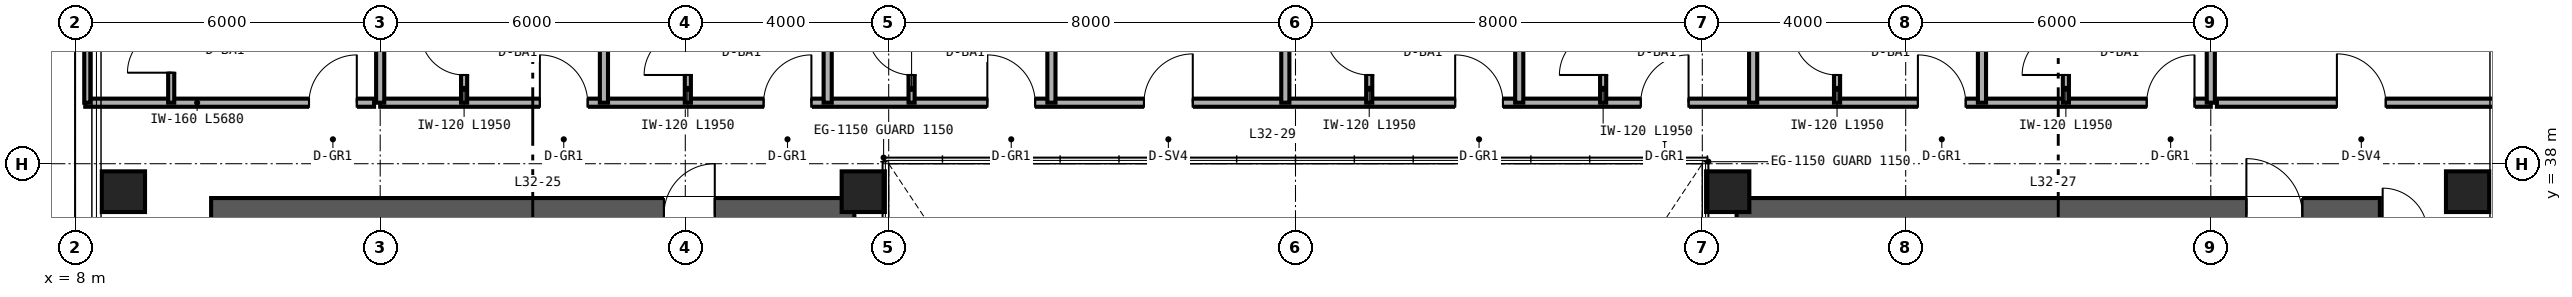
"""IFC4 building model, lengths in metres.
Left out: names, types, materials, properties, quantities, classifications, styles, units other than length and angle.
Written with IfcOpenShell. Run it as: python <this file> out.ifc"""

import sys

from ifc_helpers import new_model, si_unit, direction, frame, frame_2d, origin, origin_2d, place, context, subcontext, project, spatial, rectangle, hollow_rectangle, extrude, source, transform, mapped, element, fill, save


model = new_model("IFC4")
c1 = context("Model", 3, precision=1e-05, world=origin(), true_north=direction((0.0, 1.0)))
c2 = subcontext(c1, "Body", "Model", "MODEL_VIEW")
j1 = project(units=[si_unit("LENGTHUNIT", "METRE"), si_unit("PLANEANGLEUNIT", "RADIAN")], contexts=[c1])
p1 = place(None, origin())
s1 = spatial("IfcSite", under=j1, at=p1, CompositionType="ELEMENT")
p2 = place(p1, origin())
s2 = spatial("IfcBuilding", under=s1, at=p2, CompositionType="ELEMENT")
p3 = place(p2, frame((0.0, 0.0, 129.6)))
s3 = spatial("IfcBuildingStorey", under=s2, at=p3, CompositionType="ELEMENT", Elevation=129.6)
p4 = place(p3, frame((10.675, 37.0, 0.0), z_axis=(0.0, 0.0, 1.0), x_axis=(1.0, 0.0, 0.0)))
e1 = element("IfcWall", 1, at=p4, inside=s3, PredefinedType="SHEAR", context=c2, shape_type="SweptSolid", body=[
    extrude(rectangle(XDim=12.65, YDim=0.65, at=frame_2d((6.325, 0.0))), origin(), (0.0, 0.0, 1.0), 3.36),
])
p5 = place(p4, frame((8.905, 0.0, 0.0)))
e2 = element("IfcOpeningElement", 2, at=p5, cuts=e1, PredefinedType="OPENING", context=c2, shape_type="SweptSolid", body=[
    extrude(rectangle(XDim=1.0, YDim=2.15, at=frame_2d((0.5, 1.075))), frame((0.0, 0.335, 0.0), z_axis=(0.0, -1.0, 0.0), x_axis=(1.0, 0.0, 0.0)), (0.0, 0.0, 1.0), 0.67),
])
p6 = place(p3, frame((40.675, 37.0, 0.0), z_axis=(0.0, 0.0, 1.0), x_axis=(1.0, 0.0, 0.0)))
e3 = element("IfcWall", 3, at=p6, inside=s3, PredefinedType="SHEAR", context=c2, shape_type="SweptSolid", body=[
    extrude(rectangle(XDim=12.65, YDim=0.65, at=frame_2d((6.325, 0.0))), origin(), (0.0, 0.0, 1.0), 3.36),
])
p7 = place(p6, frame((10.025, 0.0, 0.0)))
e4 = element("IfcOpeningElement", 4, at=p7, cuts=e3, PredefinedType="OPENING", context=c2, shape_type="SweptSolid", body=[
    extrude(rectangle(XDim=1.1, YDim=2.15, at=frame_2d((0.55, 1.075))), frame((0.0, 0.335, 0.0), z_axis=(0.0, -1.0, 0.0), x_axis=(1.0, 0.0, 0.0)), (0.0, 0.0, 1.0), 0.67),
])
m1 = source(origin(), c2, "Body", "SweptSolid", [
    extrude(hollow_rectangle(XDim=0.85, YDim=0.8, WallThickness=0.032, at=origin_2d()), origin(), (0.0, 0.0, 1.0), 3.36),
])
for number, where, z_axis, x_axis in (
    (5, (8.95, 37.45, 0.0), (0.0, 0.0, 1.0), (1.0, 0.0, 0.0)),
    (6, (23.5, 37.45, 0.0), (0.0, 0.0, 1.0), (1.0, 0.0, 0.0)),
    (7, (40.5, 37.45, 0.0), (0.0, 0.0, 1.0), (1.0, 0.0, 0.0)),
    (8, (55.05, 37.45, 0.0), (0.0, 0.0, 1.0), (1.0, 0.0, 0.0)),
):
    element("IfcColumn", number, at=place(p3, frame(where, z_axis=z_axis, x_axis=x_axis)), inside=s3, PredefinedType="COLUMN", context=c2, shape_type="MappedRepresentation", body=[
        mapped(m1, transform((0.0, 0.0, 0.0), scale=1.0)),
    ])
p8 = place(p3, frame((8.2, 39.2, 0.0), z_axis=(0.0, 0.0, 1.0), x_axis=(1.0, 0.0, 0.0)))
e9 = element("IfcWall", 9, at=p8, inside=s3, PredefinedType="PARTITIONING", context=c2, shape_type="SweptSolid", body=[
    extrude(rectangle(XDim=5.68, YDim=0.16, at=frame_2d((2.84, 0.0))), origin(), (0.0, 0.0, 1.0), 3.36),
])
p9 = place(p8, frame((4.4, 0.0, 0.0)))
e10 = element("IfcOpeningElement", 10, at=p9, cuts=e9, PredefinedType="OPENING", context=c2, shape_type="SweptSolid", body=[
    extrude(rectangle(XDim=0.94, YDim=2.15, at=frame_2d((0.47, 1.075))), frame((0.0, 0.09, 0.0), z_axis=(0.0, -1.0, 0.0), x_axis=(1.0, 0.0, 0.0)), (0.0, 0.0, 1.0), 0.18),
])
p10 = place(p3, frame((9.89, 39.2, 0.0), z_axis=(0.0, 0.0, 1.0), x_axis=(0.0, 1.0, 0.0)))
e11 = element("IfcWall", 11, at=p10, inside=s3, PredefinedType="PARTITIONING", context=c2, shape_type="SweptSolid", body=[
    extrude(rectangle(XDim=2.04, YDim=0.12, at=frame_2d((1.02, 0.0))), origin(), (0.0, 0.0, 1.0), 3.36),
])
p11 = place(p10, frame((0.59, 0.0, 0.0)))
e12 = element("IfcOpeningElement", 12, at=p11, cuts=e11, PredefinedType="OPENING", context=c2, shape_type="SweptSolid", body=[
    extrude(rectangle(XDim=0.86, YDim=2.1, at=frame_2d((0.43, 1.05))), frame((0.0, 0.07, 0.0), z_axis=(0.0, -1.0, 0.0), x_axis=(1.0, 0.0, 0.0)), (0.0, 0.0, 1.0), 0.14),
])
p12 = place(p3, frame((8.24, 39.2, 0.0), z_axis=(0.0, 0.0, 1.0), x_axis=(0.0, 1.0, 0.0)))
e13 = element("IfcWall", 13, at=p12, inside=s3, PredefinedType="PARTITIONING", context=c2, shape_type="SweptSolid", body=[
    extrude(rectangle(XDim=2.04, YDim=0.12, at=frame_2d((1.02, 0.0))), origin(), (0.0, 0.0, 1.0), 3.36),
])
p13 = place(p3, frame((50.12, 39.2, 0.0), z_axis=(0.0, 0.0, 1.0), x_axis=(1.0, 0.0, 0.0)))
e14 = element("IfcWall", 14, at=p13, inside=s3, PredefinedType="PARTITIONING", context=c2, shape_type="SweptSolid", body=[
    extrude(rectangle(XDim=5.68, YDim=0.16, at=frame_2d((2.84, 0.0))), origin(), (0.0, 0.0, 1.0), 3.36),
])
p14 = place(p13, frame((2.36, 0.0, 0.0)))
e15 = element("IfcOpeningElement", 15, at=p14, cuts=e14, PredefinedType="OPENING", context=c2, shape_type="SweptSolid", body=[
    extrude(rectangle(XDim=0.96, YDim=2.15, at=frame_2d((0.48, 1.075))), frame((0.0, 0.09, 0.0), z_axis=(0.0, -1.0, 0.0), x_axis=(1.0, 0.0, 0.0)), (0.0, 0.0, 1.0), 0.18),
])
p15 = place(p3, frame((14.0, 39.2, 0.0), z_axis=(0.0, 0.0, 1.0), x_axis=(1.0, 0.0, 0.0)))
e16 = element("IfcWall", 16, at=p15, inside=s3, PredefinedType="PARTITIONING", context=c2, shape_type="SweptSolid", body=[
    extrude(rectangle(XDim=36.0, YDim=0.16, at=frame_2d((18.0, 0.0))), origin(), (0.0, 0.0, 1.0), 2.581),
])
p16 = place(p15, frame((3.14, 0.0, 0.0)))
e17 = element("IfcOpeningElement", 17, at=p16, cuts=e16, PredefinedType="OPENING", context=c2, shape_type="SweptSolid", body=[
    extrude(rectangle(XDim=0.94, YDim=2.15, at=frame_2d((0.47, 1.075))), frame((0.0, 0.09, 0.0), z_axis=(0.0, -1.0, 0.0), x_axis=(1.0, 0.0, 0.0)), (0.0, 0.0, 1.0), 0.18),
])
p17 = place(p15, frame((7.54, 0.0, 0.0)))
e18 = element("IfcOpeningElement", 18, at=p17, cuts=e16, PredefinedType="OPENING", context=c2, shape_type="SweptSolid", body=[
    extrude(rectangle(XDim=0.94, YDim=2.15, at=frame_2d((0.47, 1.075))), frame((0.0, 0.09, 0.0), z_axis=(0.0, -1.0, 0.0), x_axis=(1.0, 0.0, 0.0)), (0.0, 0.0, 1.0), 0.18),
])
p18 = place(p15, frame((11.94, 0.0, 0.0)))
e19 = element("IfcOpeningElement", 19, at=p18, cuts=e16, PredefinedType="OPENING", context=c2, shape_type="SweptSolid", body=[
    extrude(rectangle(XDim=0.94, YDim=2.15, at=frame_2d((0.47, 1.075))), frame((0.0, 0.09, 0.0), z_axis=(0.0, -1.0, 0.0), x_axis=(1.0, 0.0, 0.0)), (0.0, 0.0, 1.0), 0.18),
])
p19 = place(p15, frame((15.02, 0.0, 0.0)))
e20 = element("IfcOpeningElement", 20, at=p19, cuts=e16, PredefinedType="OPENING", context=c2, shape_type="SweptSolid", body=[
    extrude(rectangle(XDim=0.96, YDim=2.15, at=frame_2d((0.48, 1.075))), frame((0.0, 0.09, 0.0), z_axis=(0.0, -1.0, 0.0), x_axis=(1.0, 0.0, 0.0)), (0.0, 0.0, 1.0), 0.18),
])
p20 = place(p15, frame((21.14, 0.0, 0.0)))
e21 = element("IfcOpeningElement", 21, at=p20, cuts=e16, PredefinedType="OPENING", context=c2, shape_type="SweptSolid", body=[
    extrude(rectangle(XDim=0.94, YDim=2.15, at=frame_2d((0.47, 1.075))), frame((0.0, 0.09, 0.0), z_axis=(0.0, -1.0, 0.0), x_axis=(1.0, 0.0, 0.0)), (0.0, 0.0, 1.0), 0.18),
])
p21 = place(p15, frame((24.79, 0.0, 0.0)))
e22 = element("IfcOpeningElement", 22, at=p21, cuts=e16, PredefinedType="OPENING", context=c2, shape_type="SweptSolid", body=[
    extrude(rectangle(XDim=0.94, YDim=2.15, at=frame_2d((0.47, 1.075))), frame((0.0, 0.09, 0.0), z_axis=(0.0, -1.0, 0.0), x_axis=(1.0, 0.0, 0.0)), (0.0, 0.0, 1.0), 0.18),
])
p22 = place(p15, frame((30.24, 0.0, 0.0)))
e23 = element("IfcOpeningElement", 23, at=p22, cuts=e16, PredefinedType="OPENING", context=c2, shape_type="SweptSolid", body=[
    extrude(rectangle(XDim=0.94, YDim=2.15, at=frame_2d((0.47, 1.075))), frame((0.0, 0.09, 0.0), z_axis=(0.0, -1.0, 0.0), x_axis=(1.0, 0.0, 0.0)), (0.0, 0.0, 1.0), 0.18),
])
p23 = place(p15, frame((34.74, 0.0, 0.0)))
e24 = element("IfcOpeningElement", 24, at=p23, cuts=e16, PredefinedType="OPENING", context=c2, shape_type="SweptSolid", body=[
    extrude(rectangle(XDim=0.94, YDim=2.15, at=frame_2d((0.47, 1.075))), frame((0.0, 0.09, 0.0), z_axis=(0.0, -1.0, 0.0), x_axis=(1.0, 0.0, 0.0)), (0.0, 0.0, 1.0), 0.18),
])
for number, where, z_axis, x_axis in (
    (25, (14.0, 39.2, 0.0), (0.0, 0.0, 1.0), (0.0, 1.0, 0.0)),
    (26, (50.0, 39.2, 0.0), (0.0, 0.0, 1.0), (0.0, 1.0, 0.0)),
    (27, (18.4, 39.2, 0.0), (0.0, 0.0, 1.0), (0.0, 1.0, 0.0)),
):
    element("IfcWall", number, at=place(p3, frame(where, z_axis=z_axis, x_axis=x_axis)), inside=s3, PredefinedType="PARTITIONING", context=c2, shape_type="SweptSolid", body=[
        extrude(rectangle(XDim=10.44, YDim=0.16, at=frame_2d((5.22, 0.0))), origin(), (0.0, 0.0, 1.0), 2.667),
    ])
p24 = place(p3, frame((15.65, 39.2, 0.0), z_axis=(0.0, 0.0, 1.0), x_axis=(0.0, 1.0, 0.0)))
e28 = element("IfcWall", 28, at=p24, inside=s3, PredefinedType="PARTITIONING", context=c2, shape_type="SweptSolid", body=[
    extrude(rectangle(XDim=1.95, YDim=0.12, at=frame_2d((0.975, 0.0))), origin(), (0.0, 0.0, 1.0), 3.36),
])
p25 = place(p24, frame((0.545, 0.0, 0.0)))
e29 = element("IfcOpeningElement", 29, at=p25, cuts=e28, PredefinedType="OPENING", context=c2, shape_type="SweptSolid", body=[
    extrude(rectangle(XDim=0.86, YDim=2.1, at=frame_2d((0.43, 1.05))), frame((0.0, 0.07, 0.0), z_axis=(0.0, -1.0, 0.0), x_axis=(1.0, 0.0, 0.0)), (0.0, 0.0, 1.0), 0.14),
])
p26 = place(p3, frame((22.8, 39.2, 0.0), z_axis=(0.0, 0.0, 1.0), x_axis=(0.0, 1.0, 0.0)))
e30 = element("IfcWall", 30, at=p26, inside=s3, PredefinedType="PARTITIONING", context=c2, shape_type="SweptSolid", body=[
    extrude(rectangle(XDim=10.44, YDim=0.16, at=frame_2d((5.22, 0.0))), origin(), (0.0, 0.0, 1.0), 2.823),
])
p27 = place(p3, frame((20.05, 39.2, 0.0), z_axis=(0.0, 0.0, 1.0), x_axis=(0.0, 1.0, 0.0)))
e31 = element("IfcWall", 31, at=p27, inside=s3, PredefinedType="PARTITIONING", context=c2, shape_type="SweptSolid", body=[
    extrude(rectangle(XDim=1.95, YDim=0.12, at=frame_2d((0.975, 0.0))), origin(), (0.0, 0.0, 1.0), 3.36),
])
p28 = place(p27, frame((0.545, 0.0, 0.0)))
e32 = element("IfcOpeningElement", 32, at=p28, cuts=e31, PredefinedType="OPENING", context=c2, shape_type="SweptSolid", body=[
    extrude(rectangle(XDim=0.86, YDim=2.1, at=frame_2d((0.43, 1.05))), frame((0.0, 0.07, 0.0), z_axis=(0.0, -1.0, 0.0), x_axis=(1.0, 0.0, 0.0)), (0.0, 0.0, 1.0), 0.14),
])
p29 = place(p3, frame((27.2, 39.2, 0.0), z_axis=(0.0, 0.0, 1.0), x_axis=(0.0, 1.0, 0.0)))
e33 = element("IfcWall", 33, at=p29, inside=s3, PredefinedType="PARTITIONING", context=c2, shape_type="SweptSolid", body=[
    extrude(rectangle(XDim=10.44, YDim=0.16, at=frame_2d((5.22, 0.0))), origin(), (0.0, 0.0, 1.0), 2.433),
])
p30 = place(p3, frame((24.45, 39.2, 0.0), z_axis=(0.0, 0.0, 1.0), x_axis=(0.0, 1.0, 0.0)))
e34 = element("IfcWall", 34, at=p30, inside=s3, PredefinedType="PARTITIONING", context=c2, shape_type="SweptSolid", body=[
    extrude(rectangle(XDim=1.95, YDim=0.12, at=frame_2d((0.975, 0.0))), origin(), (0.0, 0.0, 1.0), 3.36),
])
p31 = place(p30, frame((0.545, 0.0, 0.0)))
e35 = element("IfcOpeningElement", 35, at=p31, cuts=e34, PredefinedType="OPENING", context=c2, shape_type="SweptSolid", body=[
    extrude(rectangle(XDim=0.86, YDim=2.1, at=frame_2d((0.43, 1.05))), frame((0.0, 0.07, 0.0), z_axis=(0.0, -1.0, 0.0), x_axis=(1.0, 0.0, 0.0)), (0.0, 0.0, 1.0), 0.14),
])
for number, where, z_axis, x_axis in (
    (36, (31.8, 39.2, 0.0), (0.0, 0.0, 1.0), (0.0, 1.0, 0.0)),
    (37, (36.4, 39.2, 0.0), (0.0, 0.0, 1.0), (0.0, 1.0, 0.0)),
):
    element("IfcWall", number, at=place(p3, frame(where, z_axis=z_axis, x_axis=x_axis)), inside=s3, PredefinedType="PARTITIONING", context=c2, shape_type="SweptSolid", body=[
        extrude(rectangle(XDim=10.44, YDim=0.16, at=frame_2d((5.22, 0.0))), origin(), (0.0, 0.0, 1.0), 2.433),
    ])
p32 = place(p3, frame((33.45, 39.2, 0.0), z_axis=(0.0, 0.0, 1.0), x_axis=(0.0, 1.0, 0.0)))
e38 = element("IfcWall", 38, at=p32, inside=s3, PredefinedType="PARTITIONING", context=c2, shape_type="SweptSolid", body=[
    extrude(rectangle(XDim=1.95, YDim=0.12, at=frame_2d((0.975, 0.0))), origin(), (0.0, 0.0, 1.0), 3.36),
])
p33 = place(p32, frame((0.545, 0.0, 0.0)))
e39 = element("IfcOpeningElement", 39, at=p33, cuts=e38, PredefinedType="OPENING", context=c2, shape_type="SweptSolid", body=[
    extrude(rectangle(XDim=0.86, YDim=2.1, at=frame_2d((0.43, 1.05))), frame((0.0, 0.07, 0.0), z_axis=(0.0, -1.0, 0.0), x_axis=(1.0, 0.0, 0.0)), (0.0, 0.0, 1.0), 0.14),
])
p34 = place(p3, frame((41.0, 39.2, 0.0), z_axis=(0.0, 0.0, 1.0), x_axis=(0.0, 1.0, 0.0)))
e40 = element("IfcWall", 40, at=p34, inside=s3, PredefinedType="PARTITIONING", context=c2, shape_type="SweptSolid", body=[
    extrude(rectangle(XDim=10.44, YDim=0.16, at=frame_2d((5.22, 0.0))), origin(), (0.0, 0.0, 1.0), 2.823),
])
p35 = place(p3, frame((38.05, 39.2, 0.0), z_axis=(0.0, 0.0, 1.0), x_axis=(0.0, 1.0, 0.0)))
e41 = element("IfcWall", 41, at=p35, inside=s3, PredefinedType="PARTITIONING", context=c2, shape_type="SweptSolid", body=[
    extrude(rectangle(XDim=1.95, YDim=0.12, at=frame_2d((0.975, 0.0))), origin(), (0.0, 0.0, 1.0), 3.36),
])
p36 = place(p35, frame((0.545, 0.0, 0.0)))
e42 = element("IfcOpeningElement", 42, at=p36, cuts=e41, PredefinedType="OPENING", context=c2, shape_type="SweptSolid", body=[
    extrude(rectangle(XDim=0.86, YDim=2.1, at=frame_2d((0.43, 1.05))), frame((0.0, 0.07, 0.0), z_axis=(0.0, -1.0, 0.0), x_axis=(1.0, 0.0, 0.0)), (0.0, 0.0, 1.0), 0.14),
])
p37 = place(p3, frame((45.5, 39.2, 0.0), z_axis=(0.0, 0.0, 1.0), x_axis=(0.0, 1.0, 0.0)))
e43 = element("IfcWall", 43, at=p37, inside=s3, PredefinedType="PARTITIONING", context=c2, shape_type="SweptSolid", body=[
    extrude(rectangle(XDim=10.44, YDim=0.16, at=frame_2d((5.22, 0.0))), origin(), (0.0, 0.0, 1.0), 2.667),
])
p38 = place(p3, frame((42.65, 39.2, 0.0), z_axis=(0.0, 0.0, 1.0), x_axis=(0.0, 1.0, 0.0)))
e44 = element("IfcWall", 44, at=p38, inside=s3, PredefinedType="PARTITIONING", context=c2, shape_type="SweptSolid", body=[
    extrude(rectangle(XDim=1.95, YDim=0.12, at=frame_2d((0.975, 0.0))), origin(), (0.0, 0.0, 1.0), 3.36),
])
p39 = place(p38, frame((0.545, 0.0, 0.0)))
e45 = element("IfcOpeningElement", 45, at=p39, cuts=e44, PredefinedType="OPENING", context=c2, shape_type="SweptSolid", body=[
    extrude(rectangle(XDim=0.86, YDim=2.1, at=frame_2d((0.43, 1.05))), frame((0.0, 0.07, 0.0), z_axis=(0.0, -1.0, 0.0), x_axis=(1.0, 0.0, 0.0)), (0.0, 0.0, 1.0), 0.14),
])
p40 = place(p3, frame((47.15, 39.2, 0.0), z_axis=(0.0, 0.0, 1.0), x_axis=(0.0, 1.0, 0.0)))
e46 = element("IfcWall", 46, at=p40, inside=s3, PredefinedType="PARTITIONING", context=c2, shape_type="SweptSolid", body=[
    extrude(rectangle(XDim=1.95, YDim=0.12, at=frame_2d((0.975, 0.0))), origin(), (0.0, 0.0, 1.0), 3.36),
])
p41 = place(p40, frame((0.545, 0.0, 0.0)))
e47 = element("IfcOpeningElement", 47, at=p41, cuts=e46, PredefinedType="OPENING", context=c2, shape_type="SweptSolid", body=[
    extrude(rectangle(XDim=0.86, YDim=2.1, at=frame_2d((0.43, 1.05))), frame((0.0, 0.07, 0.0), z_axis=(0.0, -1.0, 0.0), x_axis=(1.0, 0.0, 0.0)), (0.0, 0.0, 1.0), 0.14),
])
m2 = source(origin(), c2, "Body", "SweptSolid", [
    extrude(rectangle(XDim=1.0, YDim=2.15, at=frame_2d((0.5, 1.075))), frame((0.0, 0.025, 0.0), z_axis=(0.0, -1.0, 0.0), x_axis=(1.0, 0.0, 0.0)), (0.0, 0.0, 1.0), 0.05),
])
p42 = place(p5, origin())
e48 = element("IfcDoor", 48, at=p42, inside=s3, OperationType="SINGLE_SWING_RIGHT", PredefinedType="DOOR", context=c2, shape_type="MappedRepresentation", body=[
    mapped(m2, transform((0.0, 0.0, 0.0), scale=1.0)),
])
fill(e2, e48)
m3 = source(origin(), c2, "Body", "SweptSolid", [
    extrude(rectangle(XDim=1.1, YDim=2.15, at=frame_2d((0.55, 1.075))), frame((0.0, 0.025, 0.0), z_axis=(0.0, -1.0, 0.0), x_axis=(1.0, 0.0, 0.0)), (0.0, 0.0, 1.0), 0.05),
])
p43 = place(p7, origin())
e49 = element("IfcDoor", 49, at=p43, inside=s3, OperationType="SINGLE_SWING_LEFT", PredefinedType="DOOR", context=c2, shape_type="MappedRepresentation", body=[
    mapped(m3, transform((0.0, 0.0, 0.0), scale=1.0)),
])
fill(e4, e49)
m4 = source(origin(), c2, "Body", "SweptSolid", [
    extrude(rectangle(XDim=0.86, YDim=2.1, at=frame_2d((0.43, 1.05))), frame((0.0, 0.025, 0.0), z_axis=(0.0, -1.0, 0.0), x_axis=(1.0, 0.0, 0.0)), (0.0, 0.0, 1.0), 0.05),
])
p44 = place(p11, origin())
e50 = element("IfcDoor", 50, at=p44, inside=s3, OperationType="SINGLE_SWING_LEFT", PredefinedType="DOOR", context=c2, shape_type="MappedRepresentation", body=[
    mapped(m4, transform((0.0, 0.0, 0.0), scale=1.0)),
])
fill(e12, e50)
m5 = source(origin(), c2, "Body", "SweptSolid", [
    extrude(rectangle(XDim=0.94, YDim=2.15, at=frame_2d((0.47, 1.075))), frame((0.0, 0.025, 0.0), z_axis=(0.0, -1.0, 0.0), x_axis=(1.0, 0.0, 0.0)), (0.0, 0.0, 1.0), 0.05),
])
p45 = place(p9, origin())
e51 = element("IfcDoor", 51, at=p45, inside=s3, OperationType="SINGLE_SWING_RIGHT", PredefinedType="DOOR", context=c2, shape_type="MappedRepresentation", body=[
    mapped(m5, transform((0.0, 0.0, 0.0), scale=1.0)),
])
fill(e10, e51)
m6 = source(origin(), c2, "Body", "SweptSolid", [
    extrude(rectangle(XDim=0.96, YDim=2.15, at=frame_2d((0.48, 1.075))), frame((0.0, 0.025, 0.0), z_axis=(0.0, -1.0, 0.0), x_axis=(1.0, 0.0, 0.0)), (0.0, 0.0, 1.0), 0.05),
])
p46 = place(p14, origin())
e52 = element("IfcDoor", 52, at=p46, inside=s3, OperationType="SINGLE_SWING_LEFT", PredefinedType="DOOR", context=c2, shape_type="MappedRepresentation", body=[
    mapped(m6, transform((0.0, 0.0, 0.0), scale=1.0)),
])
fill(e15, e52)
p47 = place(p25, origin())
e53 = element("IfcDoor", 53, at=p47, inside=s3, OperationType="SINGLE_SWING_RIGHT", PredefinedType="DOOR", context=c2, shape_type="MappedRepresentation", body=[
    mapped(m4, transform((0.0, 0.0, 0.0), scale=1.0)),
])
fill(e29, e53)
p48 = place(p28, origin())
e54 = element("IfcDoor", 54, at=p48, inside=s3, OperationType="SINGLE_SWING_LEFT", PredefinedType="DOOR", context=c2, shape_type="MappedRepresentation", body=[
    mapped(m4, transform((0.0, 0.0, 0.0), scale=1.0)),
])
fill(e32, e54)
p49 = place(p31, origin())
e55 = element("IfcDoor", 55, at=p49, inside=s3, OperationType="SINGLE_SWING_RIGHT", PredefinedType="DOOR", context=c2, shape_type="MappedRepresentation", body=[
    mapped(m4, transform((0.0, 0.0, 0.0), scale=1.0)),
])
fill(e35, e55)
p50 = place(p33, origin())
e56 = element("IfcDoor", 56, at=p50, inside=s3, OperationType="SINGLE_SWING_RIGHT", PredefinedType="DOOR", context=c2, shape_type="MappedRepresentation", body=[
    mapped(m4, transform((0.0, 0.0, 0.0), scale=1.0)),
])
fill(e39, e56)
p51 = place(p36, origin())
e57 = element("IfcDoor", 57, at=p51, inside=s3, OperationType="SINGLE_SWING_LEFT", PredefinedType="DOOR", context=c2, shape_type="MappedRepresentation", body=[
    mapped(m4, transform((0.0, 0.0, 0.0), scale=1.0)),
])
fill(e42, e57)
p52 = place(p39, origin())
e58 = element("IfcDoor", 58, at=p52, inside=s3, OperationType="SINGLE_SWING_RIGHT", PredefinedType="DOOR", context=c2, shape_type="MappedRepresentation", body=[
    mapped(m4, transform((0.0, 0.0, 0.0), scale=1.0)),
])
fill(e45, e58)
p53 = place(p41, origin())
e59 = element("IfcDoor", 59, at=p53, inside=s3, OperationType="SINGLE_SWING_LEFT", PredefinedType="DOOR", context=c2, shape_type="MappedRepresentation", body=[
    mapped(m4, transform((0.0, 0.0, 0.0), scale=1.0)),
])
fill(e47, e59)
p54 = place(p16, origin())
e60 = element("IfcDoor", 60, at=p54, inside=s3, OperationType="SINGLE_SWING_LEFT", PredefinedType="DOOR", context=c2, shape_type="MappedRepresentation", body=[
    mapped(m5, transform((0.0, 0.0, 0.0), scale=1.0)),
])
fill(e17, e60)
p55 = place(p17, origin())
e61 = element("IfcDoor", 61, at=p55, inside=s3, OperationType="SINGLE_SWING_RIGHT", PredefinedType="DOOR", context=c2, shape_type="MappedRepresentation", body=[
    mapped(m5, transform((0.0, 0.0, 0.0), scale=1.0)),
])
fill(e18, e61)
p56 = place(p18, origin())
e62 = element("IfcDoor", 62, at=p56, inside=s3, OperationType="SINGLE_SWING_LEFT", PredefinedType="DOOR", context=c2, shape_type="MappedRepresentation", body=[
    mapped(m5, transform((0.0, 0.0, 0.0), scale=1.0)),
])
fill(e19, e62)
p57 = place(p19, origin())
e63 = element("IfcDoor", 63, at=p57, inside=s3, OperationType="SINGLE_SWING_RIGHT", PredefinedType="DOOR", context=c2, shape_type="MappedRepresentation", body=[
    mapped(m6, transform((0.0, 0.0, 0.0), scale=1.0)),
])
fill(e20, e63)
p58 = place(p20, origin())
e64 = element("IfcDoor", 64, at=p58, inside=s3, OperationType="SINGLE_SWING_LEFT", PredefinedType="DOOR", context=c2, shape_type="MappedRepresentation", body=[
    mapped(m5, transform((0.0, 0.0, 0.0), scale=1.0)),
])
fill(e21, e64)
p59 = place(p21, origin())
e65 = element("IfcDoor", 65, at=p59, inside=s3, OperationType="SINGLE_SWING_RIGHT", PredefinedType="DOOR", context=c2, shape_type="MappedRepresentation", body=[
    mapped(m5, transform((0.0, 0.0, 0.0), scale=1.0)),
])
fill(e22, e65)
p60 = place(p22, origin())
e66 = element("IfcDoor", 66, at=p60, inside=s3, OperationType="SINGLE_SWING_LEFT", PredefinedType="DOOR", context=c2, shape_type="MappedRepresentation", body=[
    mapped(m5, transform((0.0, 0.0, 0.0), scale=1.0)),
])
fill(e23, e66)
p61 = place(p23, origin())
e67 = element("IfcDoor", 67, at=p61, inside=s3, OperationType="SINGLE_SWING_RIGHT", PredefinedType="DOOR", context=c2, shape_type="MappedRepresentation", body=[
    mapped(m5, transform((0.0, 0.0, 0.0), scale=1.0)),
])
fill(e24, e67)
save(model, sys.argv[1])
